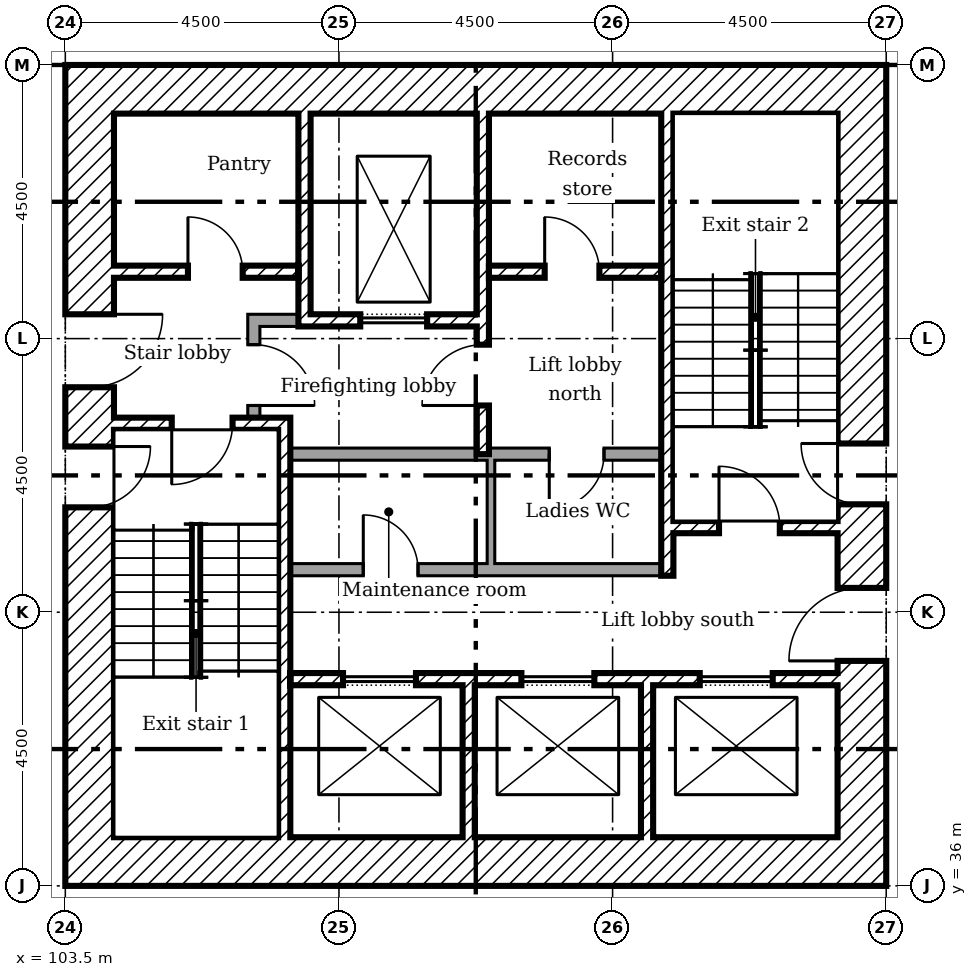
"""IFC4 building model, lengths in metres.
Left out: names, types, materials, properties, quantities, classifications, styles, units other than length and angle.
Written with IfcOpenShell. Run it as: python <this file> out.ifc"""

import sys

from ifc_helpers import new_model, si_unit, direction, frame, frame_2d, origin, place, context, subcontext, project, spatial, rectangle, extrude, element, fill, save


model = new_model("IFC4")
c1 = context("Model", 3, precision=1e-05, world=origin(), true_north=direction((0.0, 1.0)))
c2 = subcontext(c1, "Body", "Model", "MODEL_VIEW")
j1 = project(units=[si_unit("LENGTHUNIT", "METRE"), si_unit("PLANEANGLEUNIT", "RADIAN")], contexts=[c1])
p1 = place(None, origin())
s1 = spatial("IfcSite", under=j1, at=p1, CompositionType="ELEMENT")
p2 = place(p1, origin())
s2 = spatial("IfcBuilding", under=s1, at=p2, CompositionType="ELEMENT")
p3 = place(p2, frame((0.0, 0.0, 87.0)))
s3 = spatial("IfcBuildingStorey", under=s2, at=p3, CompositionType="ELEMENT", Elevation=87.0)
p4 = place(p3, frame((116.6, 36.0, 0.0), z_axis=(0.0, 0.0, 1.0), x_axis=(0.0, 1.0, 0.0)))
e1 = element("IfcWall", 1, at=p4, inside=s3, PredefinedType="SHEAR", context=c2, shape_type="SweptSolid", body=[
    extrude(rectangle(XDim=13.5, YDim=0.8, at=frame_2d((6.75, 0.0))), origin(), (0.0, 0.0, 1.0), 4.75),
])
p5 = place(p4, frame((3.7, 0.0, 0.0)))
e2 = element("IfcOpeningElement", 2, at=p5, cuts=e1, PredefinedType="OPENING", context=c2, shape_type="SweptSolid", body=[
    extrude(rectangle(XDim=1.2, YDim=2.1, at=frame_2d((0.6, 1.05))), frame((0.0, 0.41, 0.0), z_axis=(0.0, -1.0, 0.0), x_axis=(1.0, 0.0, 0.0)), (0.0, 0.0, 1.0), 0.82),
])
p6 = place(p4, frame((6.275, 0.0, 0.0)))
e3 = element("IfcOpeningElement", 3, at=p6, cuts=e1, PredefinedType="OPENING", context=c2, shape_type="SweptSolid", body=[
    extrude(rectangle(XDim=1.0, YDim=2.1, at=frame_2d((0.5, 1.05))), frame((0.0, 0.41, 0.0), z_axis=(0.0, -1.0, 0.0), x_axis=(1.0, 0.0, 0.0)), (0.0, 0.0, 1.0), 0.82),
])
for number, where in (
    (4, (104.3, 49.1, 0.0)),
    (5, (104.3, 36.4, 0.0)),
):
    element("IfcWall", number, at=place(p3, frame(where)), inside=s3, PredefinedType="SHEAR", context=c2, shape_type="SweptSolid", body=[
        extrude(rectangle(XDim=11.9, YDim=0.8, at=frame_2d((5.95, 0.0))), origin(), (0.0, 0.0, 1.0), 4.75),
    ])
p7 = place(p3, frame((103.9, 36.0, 0.0), z_axis=(0.0, 0.0, 1.0), x_axis=(0.0, 1.0, 0.0)))
e6 = element("IfcWall", 6, at=p7, inside=s3, PredefinedType="SHEAR", context=c2, shape_type="SweptSolid", body=[
    extrude(rectangle(XDim=13.5, YDim=0.8, at=frame_2d((6.75, 0.0))), origin(), (0.0, 0.0, 1.0), 4.75),
])
p8 = place(p7, frame((8.2, 0.0, 0.0)))
e7 = element("IfcOpeningElement", 7, at=p8, cuts=e6, PredefinedType="OPENING", context=c2, shape_type="SweptSolid", body=[
    extrude(rectangle(XDim=1.2, YDim=2.1, at=frame_2d((0.6, 1.05))), frame((0.0, 0.41, 0.0), z_axis=(0.0, -1.0, 0.0), x_axis=(1.0, 0.0, 0.0)), (0.0, 0.0, 1.0), 0.82),
])
p9 = place(p7, frame((6.225, 0.0, 0.0)))
e8 = element("IfcOpeningElement", 8, at=p9, cuts=e6, PredefinedType="OPENING", context=c2, shape_type="SweptSolid", body=[
    extrude(rectangle(XDim=1.0, YDim=2.1, at=frame_2d((0.5, 1.05))), frame((0.0, 0.41, 0.0), z_axis=(0.0, -1.0, 0.0), x_axis=(1.0, 0.0, 0.0)), (0.0, 0.0, 1.0), 0.82),
])
p10 = place(p3, frame((107.433, 48.7, 0.0), z_axis=(0.0, 0.0, 1.0), x_axis=(0.0, -1.0, 0.0)))
e9 = element("IfcWall", 9, at=p10, inside=s3, PredefinedType="SHEAR", context=c2, shape_type="SweptSolid", body=[
    extrude(rectangle(XDim=3.5, YDim=0.2, at=frame_2d((1.75, 0.0))), origin(), (0.0, 0.0, 1.0), 4.75),
])
p11 = place(p3, frame((110.367, 48.7, 0.0), z_axis=(0.0, 0.0, 1.0), x_axis=(0.0, -1.0, 0.0)))
e10 = element("IfcWall", 10, at=p11, inside=s3, PredefinedType="SHEAR", context=c2, shape_type="SweptSolid", body=[
    extrude(rectangle(XDim=5.6, YDim=0.2, at=frame_2d((2.8, 0.0))), origin(), (0.0, 0.0, 1.0), 4.75),
])
p12 = place(p11, frame((3.8, 0.0, 0.0)))
e11 = element("IfcOpeningElement", 11, at=p12, cuts=e10, PredefinedType="OPENING", context=c2, shape_type="SweptSolid", body=[
    extrude(rectangle(XDim=1.0, YDim=2.1, at=frame_2d((0.5, 1.05))), frame((0.0, 0.11, 0.0), z_axis=(0.0, -1.0, 0.0), x_axis=(1.0, 0.0, 0.0)), (0.0, 0.0, 1.0), 0.22),
])
for number, where, z_axis, x_axis in (
    (12, (110.133, 36.8, 0.0), (0.0, 0.0, 1.0), (0.0, 1.0, 0.0)),
    (13, (113.067, 36.8, 0.0), (0.0, 0.0, 1.0), (0.0, 1.0, 0.0)),
):
    element("IfcWall", number, at=place(p3, frame(where, z_axis=z_axis, x_axis=x_axis)), inside=s3, PredefinedType="SHEAR", context=c2, shape_type="SweptSolid", body=[
        extrude(rectangle(XDim=2.5, YDim=0.2, at=frame_2d((1.25, 0.0))), origin(), (0.0, 0.0, 1.0), 4.75),
    ])
p13 = place(p3, frame((106.5, 45.3, 0.0)))
e14 = element("IfcWall", 14, at=p13, inside=s3, PredefinedType="PARTITIONING", context=c2, shape_type="SweptSolid", body=[
    extrude(rectangle(XDim=0.833, YDim=0.2, at=frame_2d((0.417, 0.0))), origin(), (0.0, 0.0, 1.0), 4.75),
])
p14 = place(p3, frame((106.6, 43.7, 0.0), z_axis=(0.0, 0.0, 1.0), x_axis=(0.0, 1.0, 0.0)))
e15 = element("IfcWall", 15, at=p14, inside=s3, PredefinedType="PARTITIONING", context=c2, shape_type="SweptSolid", body=[
    extrude(rectangle(XDim=1.5, YDim=0.2, at=frame_2d((0.75, 0.0))), origin(), (0.0, 0.0, 1.0), 4.75),
])
p15 = place(p14, frame((0.2, 0.0, 0.0)))
e16 = element("IfcOpeningElement", 16, at=p15, cuts=e15, PredefinedType="OPENING", context=c2, shape_type="SweptSolid", body=[
    extrude(rectangle(XDim=1.0, YDim=2.1, at=frame_2d((0.5, 1.05))), frame((0.0, 0.11, 0.0), z_axis=(0.0, -1.0, 0.0), x_axis=(1.0, 0.0, 0.0)), (0.0, 0.0, 1.0), 0.22),
])
p16 = place(p3, frame((104.3, 46.1, 0.0)))
e17 = element("IfcWall", 17, at=p16, inside=s3, PredefinedType="SHEAR", context=c2, shape_type="SweptSolid", body=[
    extrude(rectangle(XDim=3.033, YDim=0.2, at=frame_2d((1.517, 0.0))), origin(), (0.0, 0.0, 1.0), 4.75),
])
p17 = place(p16, frame((1.217, 0.0, 0.0)))
e18 = element("IfcOpeningElement", 18, at=p17, cuts=e17, PredefinedType="OPENING", context=c2, shape_type="SweptSolid", body=[
    extrude(rectangle(XDim=0.9, YDim=2.1, at=frame_2d((0.45, 1.05))), frame((0.0, 0.11, 0.0), z_axis=(0.0, -1.0, 0.0), x_axis=(1.0, 0.0, 0.0)), (0.0, 0.0, 1.0), 0.22),
])
p18 = place(p3, frame((110.467, 46.1, 0.0)))
e19 = element("IfcWall", 19, at=p18, inside=s3, PredefinedType="SHEAR", context=c2, shape_type="SweptSolid", body=[
    extrude(rectangle(XDim=2.833, YDim=0.2, at=frame_2d((1.417, 0.0))), origin(), (0.0, 0.0, 1.0), 4.75),
])
p19 = place(p18, frame((0.917, 0.0, 0.0)))
e20 = element("IfcOpeningElement", 20, at=p19, cuts=e19, PredefinedType="OPENING", context=c2, shape_type="SweptSolid", body=[
    extrude(rectangle(XDim=0.9, YDim=2.1, at=frame_2d((0.45, 1.05))), frame((0.0, 0.11, 0.0), z_axis=(0.0, -1.0, 0.0), x_axis=(1.0, 0.0, 0.0)), (0.0, 0.0, 1.0), 0.22),
])
p20 = place(p3, frame((107.533, 45.3, 0.0)))
e21 = element("IfcWall", 21, at=p20, inside=s3, PredefinedType="SHEAR", context=c2, shape_type="SweptSolid", body=[
    extrude(rectangle(XDim=2.733, YDim=0.2, at=frame_2d((1.367, 0.0))), origin(), (0.0, 0.0, 1.0), 4.75),
])
p21 = place(p20, frame((0.817, 0.0, 0.0)))
e22 = element("IfcOpeningElement", 22, at=p21, cuts=e21, PredefinedType="OPENING", context=c2, shape_type="SweptSolid", body=[
    extrude(rectangle(XDim=1.1, YDim=2.1, at=frame_2d((0.55, 1.05))), frame((0.0, 0.11, 0.0), z_axis=(0.0, -1.0, 0.0), x_axis=(1.0, 0.0, 0.0)), (0.0, 0.0, 1.0), 0.22),
])
p22 = place(p3, frame((107.2, 39.4, 0.0)))
e23 = element("IfcWall", 23, at=p22, inside=s3, PredefinedType="SHEAR", context=c2, shape_type="SweptSolid", body=[
    extrude(rectangle(XDim=9.0, YDim=0.2, at=frame_2d((4.5, 0.0))), origin(), (0.0, 0.0, 1.0), 4.75),
])
p23 = place(p22, frame((0.867, 0.0, 0.0)))
e24 = element("IfcOpeningElement", 24, at=p23, cuts=e23, PredefinedType="OPENING", context=c2, shape_type="SweptSolid", body=[
    extrude(rectangle(XDim=1.2, YDim=2.1, at=frame_2d((0.6, 1.05))), frame((0.0, 0.11, 0.0), z_axis=(0.0, -1.0, 0.0), x_axis=(1.0, 0.0, 0.0)), (0.0, 0.0, 1.0), 0.22),
])
p24 = place(p22, frame((3.8, 0.0, 0.0)))
e25 = element("IfcOpeningElement", 25, at=p24, cuts=e23, PredefinedType="OPENING", context=c2, shape_type="SweptSolid", body=[
    extrude(rectangle(XDim=1.2, YDim=2.1, at=frame_2d((0.6, 1.05))), frame((0.0, 0.11, 0.0), z_axis=(0.0, -1.0, 0.0), x_axis=(1.0, 0.0, 0.0)), (0.0, 0.0, 1.0), 0.22),
])
p25 = place(p22, frame((6.733, 0.0, 0.0)))
e26 = element("IfcOpeningElement", 26, at=p25, cuts=e23, PredefinedType="OPENING", context=c2, shape_type="SweptSolid", body=[
    extrude(rectangle(XDim=1.2, YDim=2.1, at=frame_2d((0.6, 1.05))), frame((0.0, 0.11, 0.0), z_axis=(0.0, -1.0, 0.0), x_axis=(1.0, 0.0, 0.0)), (0.0, 0.0, 1.0), 0.22),
])
p26 = place(p3, frame((107.1, 36.8, 0.0), z_axis=(0.0, 0.0, 1.0), x_axis=(0.0, 1.0, 0.0)))
e27 = element("IfcWall", 27, at=p26, inside=s3, PredefinedType="SHEAR", context=c2, shape_type="SweptSolid", body=[
    extrude(rectangle(XDim=6.9, YDim=0.2, at=frame_2d((3.45, 0.0))), origin(), (0.0, 0.0, 1.0), 4.75),
])
p27 = place(p3, frame((104.3, 43.6, 0.0)))
e28 = element("IfcWall", 28, at=p27, inside=s3, PredefinedType="SHEAR", context=c2, shape_type="SweptSolid", body=[
    extrude(rectangle(XDim=2.7, YDim=0.2, at=frame_2d((1.35, 0.0))), origin(), (0.0, 0.0, 1.0), 4.75),
])
p28 = place(p27, frame((0.95, 0.0, 0.0)))
e29 = element("IfcOpeningElement", 29, at=p28, cuts=e28, PredefinedType="OPENING", context=c2, shape_type="SweptSolid", body=[
    extrude(rectangle(XDim=1.0, YDim=2.1, at=frame_2d((0.5, 1.05))), frame((0.0, 0.11, 0.0), z_axis=(0.0, -1.0, 0.0), x_axis=(1.0, 0.0, 0.0)), (0.0, 0.0, 1.0), 0.22),
])
p29 = place(p3, frame((113.5, 41.9, 0.0)))
e30 = element("IfcWall", 30, at=p29, inside=s3, PredefinedType="SHEAR", context=c2, shape_type="SweptSolid", body=[
    extrude(rectangle(XDim=2.7, YDim=0.2, at=frame_2d((1.35, 0.0))), origin(), (0.0, 0.0, 1.0), 4.75),
])
p30 = place(p29, frame((0.75, 0.0, 0.0)))
e31 = element("IfcOpeningElement", 31, at=p30, cuts=e30, PredefinedType="OPENING", context=c2, shape_type="SweptSolid", body=[
    extrude(rectangle(XDim=1.0, YDim=2.1, at=frame_2d((0.5, 1.05))), frame((0.0, 0.11, 0.0), z_axis=(0.0, -1.0, 0.0), x_axis=(1.0, 0.0, 0.0)), (0.0, 0.0, 1.0), 0.22),
])
p31 = place(p3, frame((113.4, 41.1, 0.0), z_axis=(0.0, 0.0, 1.0), x_axis=(0.0, 1.0, 0.0)))
e32 = element("IfcWall", 32, at=p31, inside=s3, PredefinedType="SHEAR", context=c2, shape_type="SweptSolid", body=[
    extrude(rectangle(XDim=7.6, YDim=0.2, at=frame_2d((3.8, 0.0))), origin(), (0.0, 0.0, 1.0), 4.75),
])
p32 = place(p3, frame((107.2, 43.1, 0.0)))
e33 = element("IfcWall", 33, at=p32, inside=s3, PredefinedType="PARTITIONING", context=c2, shape_type="SweptSolid", body=[
    extrude(rectangle(XDim=6.1, YDim=0.2, at=frame_2d((3.05, 0.0))), origin(), (0.0, 0.0, 1.0), 4.75),
])
p33 = place(p32, frame((4.259, 0.0, 0.0)))
e34 = element("IfcOpeningElement", 34, at=p33, cuts=e33, PredefinedType="OPENING", context=c2, shape_type="SweptSolid", body=[
    extrude(rectangle(XDim=0.9, YDim=2.1, at=frame_2d((0.45, 1.05))), frame((0.0, 0.11, 0.0), z_axis=(0.0, -1.0, 0.0), x_axis=(1.0, 0.0, 0.0)), (0.0, 0.0, 1.0), 0.22),
])
p34 = place(p3, frame((107.2, 41.2, 0.0)))
e35 = element("IfcWall", 35, at=p34, inside=s3, PredefinedType="PARTITIONING", context=c2, shape_type="SweptSolid", body=[
    extrude(rectangle(XDim=6.1, YDim=0.2, at=frame_2d((3.05, 0.0))), origin(), (0.0, 0.0, 1.0), 4.75),
])
p35 = place(p34, frame((1.2, 0.0, 0.0)))
e36 = element("IfcOpeningElement", 36, at=p35, cuts=e35, PredefinedType="OPENING", context=c2, shape_type="SweptSolid", body=[
    extrude(rectangle(XDim=0.9, YDim=2.1, at=frame_2d((0.45, 1.05))), frame((0.0, 0.11, 0.0), z_axis=(0.0, -1.0, 0.0), x_axis=(1.0, 0.0, 0.0)), (0.0, 0.0, 1.0), 0.22),
])
p36 = place(p3, frame((110.5, 41.3, 0.0), z_axis=(0.0, 0.0, 1.0), x_axis=(0.0, 1.0, 0.0)))
e37 = element("IfcWall", 37, at=p36, inside=s3, PredefinedType="PARTITIONING", context=c2, shape_type="SweptSolid", body=[
    extrude(rectangle(XDim=1.7, YDim=0.125, at=frame_2d((0.85, 0.0))), origin(), (0.0, 0.0, 1.0), 4.75),
])
p37 = place(p8, frame((1.2, 0.0, 0.0), x_axis=(-1.0, 0.0, 0.0)))
e38 = element("IfcDoor", 38, at=p37, inside=s3, OperationType="SINGLE_SWING_RIGHT", PredefinedType="DOOR", context=c2, shape_type="SweptSolid", body=[
    extrude(rectangle(XDim=1.2, YDim=2.1, at=frame_2d((0.6, 1.05))), frame((0.0, 0.025, 0.0), z_axis=(0.0, -1.0, 0.0), x_axis=(1.0, 0.0, 0.0)), (0.0, 0.0, 1.0), 0.05),
])
fill(e7, e38)
p38 = place(p5, origin())
e39 = element("IfcDoor", 39, at=p38, inside=s3, OperationType="SINGLE_SWING_RIGHT", PredefinedType="DOOR", context=c2, shape_type="SweptSolid", body=[
    extrude(rectangle(XDim=1.2, YDim=2.1, at=frame_2d((0.6, 1.05))), frame((0.0, 0.025, 0.0), z_axis=(0.0, -1.0, 0.0), x_axis=(1.0, 0.0, 0.0)), (0.0, 0.0, 1.0), 0.05),
])
fill(e2, e39)
p39 = place(p28, frame((1.0, 0.0, 0.0), x_axis=(-1.0, 0.0, 0.0)))
e40 = element("IfcDoor", 40, at=p39, inside=s3, OperationType="SINGLE_SWING_LEFT", PredefinedType="DOOR", context=c2, shape_type="SweptSolid", body=[
    extrude(rectangle(XDim=1.0, YDim=2.1, at=frame_2d((0.5, 1.05))), frame((0.0, 0.025, 0.0), z_axis=(0.0, -1.0, 0.0), x_axis=(1.0, 0.0, 0.0)), (0.0, 0.0, 1.0), 0.05),
])
fill(e29, e40)
p40 = place(p9, frame((1.0, 0.0, 0.0), x_axis=(-1.0, 0.0, 0.0)))
e41 = element("IfcDoor", 41, at=p40, inside=s3, OperationType="SINGLE_SWING_RIGHT", PredefinedType="DOOR", context=c2, shape_type="SweptSolid", body=[
    extrude(rectangle(XDim=1.0, YDim=2.1, at=frame_2d((0.5, 1.05))), frame((0.0, 0.025, 0.0), z_axis=(0.0, -1.0, 0.0), x_axis=(1.0, 0.0, 0.0)), (0.0, 0.0, 1.0), 0.05),
])
fill(e8, e41)
p41 = place(p30, origin())
e42 = element("IfcDoor", 42, at=p41, inside=s3, OperationType="SINGLE_SWING_RIGHT", PredefinedType="DOOR", context=c2, shape_type="SweptSolid", body=[
    extrude(rectangle(XDim=1.0, YDim=2.1, at=frame_2d((0.5, 1.05))), frame((0.0, 0.025, 0.0), z_axis=(0.0, -1.0, 0.0), x_axis=(1.0, 0.0, 0.0)), (0.0, 0.0, 1.0), 0.05),
])
fill(e31, e42)
p42 = place(p6, origin())
e43 = element("IfcDoor", 43, at=p42, inside=s3, OperationType="SINGLE_SWING_LEFT", PredefinedType="DOOR", context=c2, shape_type="SweptSolid", body=[
    extrude(rectangle(XDim=1.0, YDim=2.1, at=frame_2d((0.5, 1.05))), frame((0.0, 0.025, 0.0), z_axis=(0.0, -1.0, 0.0), x_axis=(1.0, 0.0, 0.0)), (0.0, 0.0, 1.0), 0.05),
])
fill(e3, e43)
p43 = place(p12, frame((1.0, 0.0, 0.0), x_axis=(-1.0, 0.0, 0.0)))
e44 = element("IfcDoor", 44, at=p43, inside=s3, OperationType="SINGLE_SWING_RIGHT", PredefinedType="DOOR", context=c2, shape_type="SweptSolid", body=[
    extrude(rectangle(XDim=1.0, YDim=2.1, at=frame_2d((0.5, 1.05))), frame((0.0, 0.025, 0.0), z_axis=(0.0, -1.0, 0.0), x_axis=(1.0, 0.0, 0.0)), (0.0, 0.0, 1.0), 0.05),
])
fill(e11, e44)
p44 = place(p15, frame((1.0, 0.0, 0.0), x_axis=(-1.0, 0.0, 0.0)))
e45 = element("IfcDoor", 45, at=p44, inside=s3, OperationType="SINGLE_SWING_LEFT", PredefinedType="DOOR", context=c2, shape_type="SweptSolid", body=[
    extrude(rectangle(XDim=1.0, YDim=2.1, at=frame_2d((0.5, 1.05))), frame((0.0, 0.025, 0.0), z_axis=(0.0, -1.0, 0.0), x_axis=(1.0, 0.0, 0.0)), (0.0, 0.0, 1.0), 0.05),
])
fill(e16, e45)
p45 = place(p17, origin())
e46 = element("IfcDoor", 46, at=p45, inside=s3, OperationType="SINGLE_SWING_RIGHT", PredefinedType="DOOR", context=c2, shape_type="SweptSolid", body=[
    extrude(rectangle(XDim=0.9, YDim=2.1, at=frame_2d((0.45, 1.05))), frame((0.0, 0.025, 0.0), z_axis=(0.0, -1.0, 0.0), x_axis=(1.0, 0.0, 0.0)), (0.0, 0.0, 1.0), 0.05),
])
fill(e18, e46)
p46 = place(p19, origin())
e47 = element("IfcDoor", 47, at=p46, inside=s3, OperationType="SINGLE_SWING_RIGHT", PredefinedType="DOOR", context=c2, shape_type="SweptSolid", body=[
    extrude(rectangle(XDim=0.9, YDim=2.1, at=frame_2d((0.45, 1.05))), frame((0.0, 0.025, 0.0), z_axis=(0.0, -1.0, 0.0), x_axis=(1.0, 0.0, 0.0)), (0.0, 0.0, 1.0), 0.05),
])
fill(e20, e47)
p47 = place(p35, origin())
e48 = element("IfcDoor", 48, at=p47, inside=s3, OperationType="SINGLE_SWING_RIGHT", PredefinedType="DOOR", context=c2, shape_type="SweptSolid", body=[
    extrude(rectangle(XDim=0.9, YDim=2.1, at=frame_2d((0.45, 1.05))), frame((0.0, 0.025, 0.0), z_axis=(0.0, -1.0, 0.0), x_axis=(1.0, 0.0, 0.0)), (0.0, 0.0, 1.0), 0.05),
])
fill(e36, e48)
p48 = place(p33, frame((0.9, 0.0, 0.0), x_axis=(-1.0, 0.0, 0.0)))
e49 = element("IfcDoor", 49, at=p48, inside=s3, OperationType="SINGLE_SWING_LEFT", PredefinedType="DOOR", context=c2, shape_type="SweptSolid", body=[
    extrude(rectangle(XDim=0.9, YDim=2.1, at=frame_2d((0.45, 1.05))), frame((0.0, 0.025, 0.0), z_axis=(0.0, -1.0, 0.0), x_axis=(1.0, 0.0, 0.0)), (0.0, 0.0, 1.0), 0.05),
])
fill(e34, e49)
p49 = place(p21, origin())
e50 = element("IfcDoor", 50, at=p49, inside=s3, OperationType="SLIDING_TO_LEFT", PredefinedType="DOOR", context=c2, shape_type="SweptSolid", body=[
    extrude(rectangle(XDim=1.1, YDim=2.1, at=frame_2d((0.55, 1.05))), frame((0.0, 0.025, 0.0), z_axis=(0.0, -1.0, 0.0), x_axis=(1.0, 0.0, 0.0)), (0.0, 0.0, 1.0), 0.05),
])
fill(e22, e50)
p50 = place(p23, origin())
e51 = element("IfcDoor", 51, at=p50, inside=s3, OperationType="SLIDING_TO_LEFT", PredefinedType="DOOR", context=c2, shape_type="SweptSolid", body=[
    extrude(rectangle(XDim=1.2, YDim=2.1, at=frame_2d((0.6, 1.05))), frame((0.0, 0.025, 0.0), z_axis=(0.0, -1.0, 0.0), x_axis=(1.0, 0.0, 0.0)), (0.0, 0.0, 1.0), 0.05),
])
fill(e24, e51)
p51 = place(p24, origin())
e52 = element("IfcDoor", 52, at=p51, inside=s3, OperationType="SLIDING_TO_LEFT", PredefinedType="DOOR", context=c2, shape_type="SweptSolid", body=[
    extrude(rectangle(XDim=1.2, YDim=2.1, at=frame_2d((0.6, 1.05))), frame((0.0, 0.025, 0.0), z_axis=(0.0, -1.0, 0.0), x_axis=(1.0, 0.0, 0.0)), (0.0, 0.0, 1.0), 0.05),
])
fill(e25, e52)
p52 = place(p25, origin())
e53 = element("IfcDoor", 53, at=p52, inside=s3, OperationType="SLIDING_TO_LEFT", PredefinedType="DOOR", context=c2, shape_type="SweptSolid", body=[
    extrude(rectangle(XDim=1.2, YDim=2.1, at=frame_2d((0.6, 1.05))), frame((0.0, 0.025, 0.0), z_axis=(0.0, -1.0, 0.0), x_axis=(1.0, 0.0, 0.0)), (0.0, 0.0, 1.0), 0.05),
])
fill(e26, e53)
save(model, sys.argv[1])
